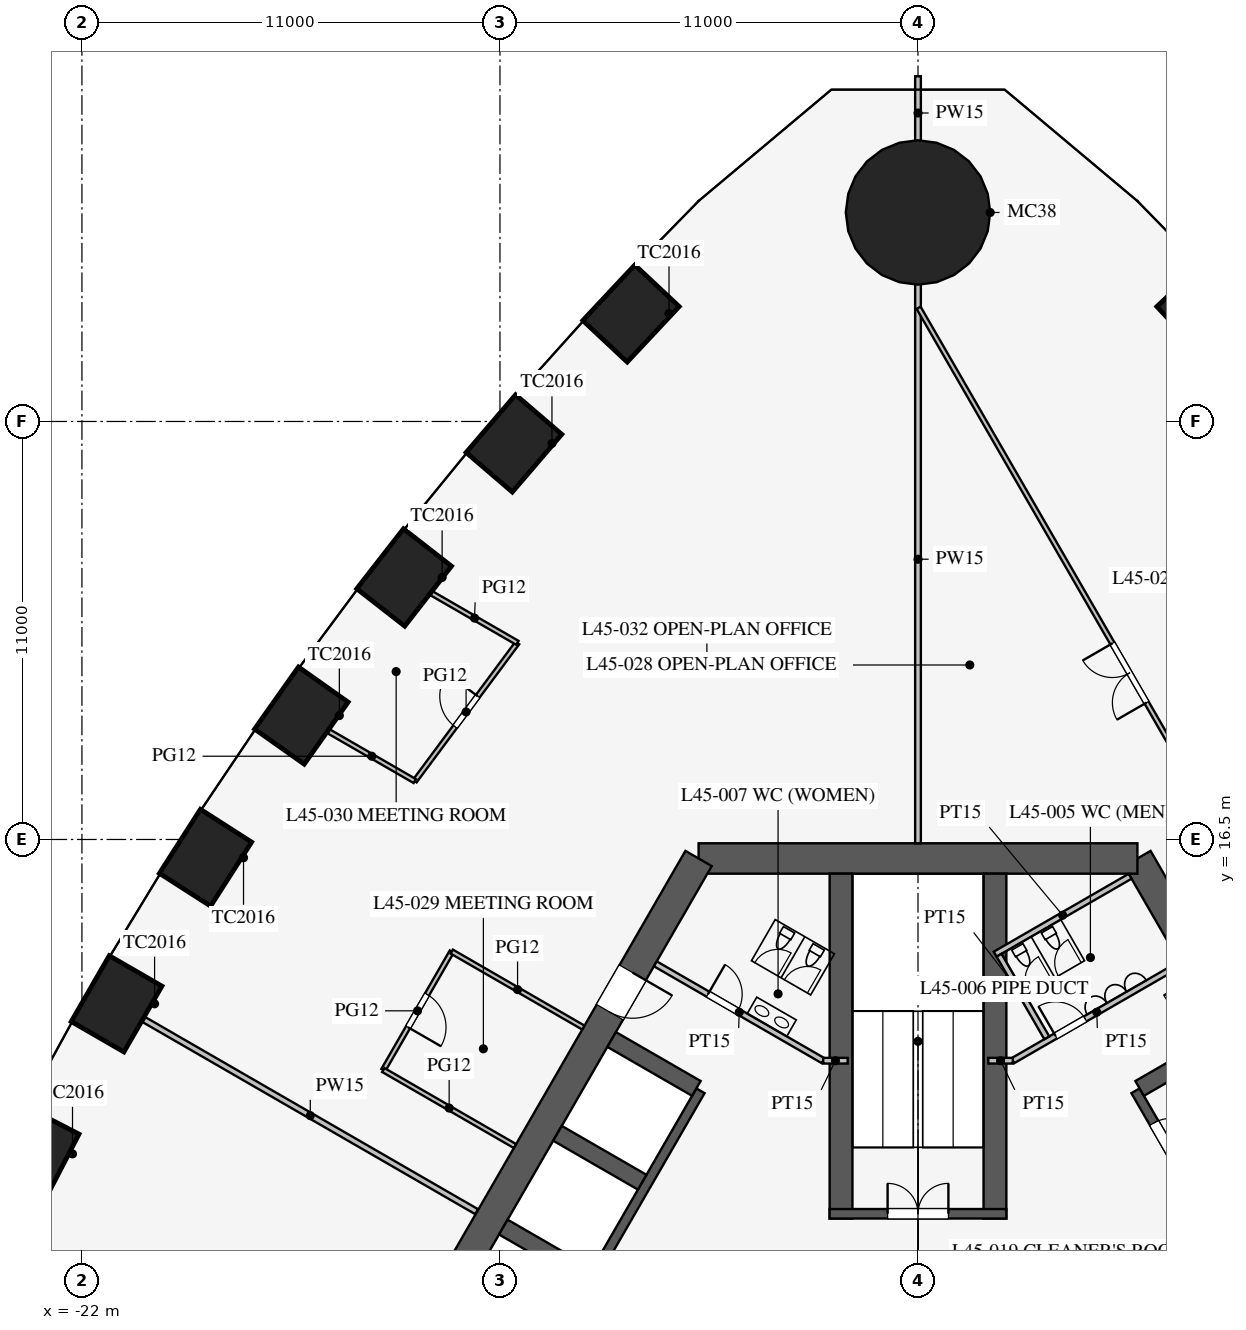
"""IFC4 building model, lengths in metres.
Left out: names, types, materials, properties, quantities, classifications, styles, units other than length and angle.
Written with IfcOpenShell. Run it as: python <this file> out.ifc"""

import sys

from ifc_helpers import new_model, si_unit, direction, frame, frame_2d, origin, origin_2d, place, context, subcontext, project, spatial, rectangle, circle, extrude, element, fill, save


model = new_model("IFC4")
c1 = context("Model", 3, precision=1e-05, world=origin(), true_north=direction((0.0, 1.0)))
c2 = subcontext(c1, "Body", "Model", "MODEL_VIEW")
j1 = project(units=[si_unit("LENGTHUNIT", "METRE"), si_unit("PLANEANGLEUNIT", "RADIAN")], contexts=[c1])
p1 = place(None, origin())
s1 = spatial("IfcSite", under=j1, at=p1, CompositionType="ELEMENT")
p2 = place(p1, origin())
s2 = spatial("IfcBuilding", under=s1, at=p2, CompositionType="ELEMENT")
p3 = place(p2, frame((0.0, 0.0, 198.1)))
s3 = spatial("IfcBuildingStorey", under=s2, at=p3, CompositionType="ELEMENT", Elevation=198.1)
for number, where, z_axis, x_axis in (
    (1, (7.552, 30.341, 0.0), (0.0, 0.0, 1.0), (-0.684, 0.73, 0.0)),
    (2, (-7.552, 30.341, 0.0), (0.0, 0.0, 1.0), (-0.684, -0.73, 0.0)),
    (3, (-10.632, 26.923, 0.0), (0.0, 0.0, 1.0), (-0.651, -0.759, 0.0)),
    (4, (-13.522, 23.396, 0.0), (0.0, 0.0, 1.0), (-0.615, -0.789, 0.0)),
    (5, (-16.227, 19.761, 0.0), (0.0, 0.0, 1.0), (-0.577, -0.816, 0.0)),
    (6, (-18.748, 16.02, 0.0), (0.0, 0.0, 1.0), (-0.539, -0.842, 0.0)),
    (7, (-21.088, 12.175, 0.0), (0.0, 0.0, 1.0), (-0.5, -0.866, 0.0)),
    (8, (-23.248, 8.226, 0.0), (0.0, 0.0, 1.0), (-0.46, -0.888, 0.0)),
):
    element("IfcColumn", number, at=place(p3, frame(where, z_axis=z_axis, x_axis=x_axis)), inside=s3, PredefinedType="COLUMN", context=c2, shape_type="SweptSolid", body=[
        extrude(rectangle(XDim=2.0, YDim=1.6, at=origin_2d()), origin(), (0.0, 0.0, 1.0), 4.2),
    ])
p4 = place(p3, frame((0.0, 33.0, 0.0), z_axis=(0.0, 0.0, 1.0), x_axis=(1.0, 0.0, 0.0)))
e9 = element("IfcColumn", 9, at=p4, inside=s3, PredefinedType="COLUMN", context=c2, shape_type="SweptSolid", body=[
    extrude(circle(Radius=1.9, at=origin_2d()), origin(), (0.0, 0.0, 1.0), 4.2),
])
p5 = place(p3, frame((16.743, -3.0, 0.0), z_axis=(0.0, 0.0, 1.0), x_axis=(-0.500002442456, 0.866023993627, 0.0)))
e10 = element("IfcWall", 10, at=p5, inside=s3, PredefinedType="SHEAR", context=c2, shape_type="SweptSolid", body=[
    extrude(rectangle(XDim=21.939, YDim=0.8, at=frame_2d((10.97, 0.0))), origin(), (0.0, 0.0, 1.0), 4.2),
])
p6 = place(p5, frame((17.27, 0.0, 0.0)))
e11 = element("IfcOpeningElement", 11, at=p6, cuts=e10, PredefinedType="OPENING", context=c2, shape_type="SweptSolid", body=[
    extrude(rectangle(XDim=1.2, YDim=2.1, at=frame_2d((0.6, 1.05))), frame((0.0, 0.41, 0.0), z_axis=(0.0, -1.0, 0.0), x_axis=(1.0, 0.0, 0.0)), (0.0, 0.0, 1.0), 0.82),
])
p7 = place(p5, frame((3.47, 0.0, 0.0)))
e12 = element("IfcOpeningElement", 12, at=p7, cuts=e10, PredefinedType="OPENING", context=c2, shape_type="SweptSolid", body=[
    extrude(rectangle(XDim=1.2, YDim=2.1, at=frame_2d((0.6, 1.05))), frame((0.0, 0.41, 0.0), z_axis=(0.0, -1.0, 0.0), x_axis=(1.0, 0.0, 0.0)), (0.0, 0.0, 1.0), 0.82),
])
p8 = place(p3, frame((5.773, 16.0, 0.0), z_axis=(0.0, 0.0, 1.0), x_axis=(-1.0, 0.0, 0.0)))
e13 = element("IfcWall", 13, at=p8, inside=s3, PredefinedType="SHEAR", context=c2, shape_type="SweptSolid", body=[
    extrude(rectangle(XDim=11.547, YDim=0.8, at=frame_2d((5.773, 0.0))), origin(), (0.0, 0.0, 1.0), 4.2),
])
p9 = place(p3, frame((-5.773, 16.0, 0.0), z_axis=(0.0, 0.0, 1.0), x_axis=(-0.500002442456, -0.866023993627, 0.0)))
e14 = element("IfcWall", 14, at=p9, inside=s3, PredefinedType="SHEAR", context=c2, shape_type="SweptSolid", body=[
    extrude(rectangle(XDim=21.939, YDim=0.8, at=frame_2d((10.97, 0.0))), origin(), (0.0, 0.0, 1.0), 4.2),
])
p10 = place(p9, frame((17.27, 0.0, 0.0)))
e15 = element("IfcOpeningElement", 15, at=p10, cuts=e14, PredefinedType="OPENING", context=c2, shape_type="SweptSolid", body=[
    extrude(rectangle(XDim=1.2, YDim=2.1, at=frame_2d((0.6, 1.05))), frame((0.0, 0.41, 0.0), z_axis=(0.0, -1.0, 0.0), x_axis=(1.0, 0.0, 0.0)), (0.0, 0.0, 1.0), 0.82),
])
p11 = place(p9, frame((3.47, 0.0, 0.0)))
e16 = element("IfcOpeningElement", 16, at=p11, cuts=e14, PredefinedType="OPENING", context=c2, shape_type="SweptSolid", body=[
    extrude(rectangle(XDim=1.2, YDim=2.1, at=frame_2d((0.6, 1.05))), frame((0.0, 0.41, 0.0), z_axis=(0.0, -1.0, 0.0), x_axis=(1.0, 0.0, 0.0)), (0.0, 0.0, 1.0), 0.82),
])
p12 = place(p3, frame((11.424, 0.014, 0.0), z_axis=(0.0, 0.0, 1.0), x_axis=(-0.500001763848, 0.866024385424, 0.0)))
e17 = element("IfcWall", 17, at=p12, inside=s3, PredefinedType="SHEAR", context=c2, shape_type="SweptSolid", body=[
    extrude(rectangle(XDim=11.4, YDim=0.25, at=frame_2d((5.7, 0.0))), origin(), (0.0, 0.0, 1.0), 4.2),
])
p13 = place(p12, frame((0.975, 0.0, 0.0)))
e18 = element("IfcOpeningElement", 18, at=p13, cuts=e17, PredefinedType="OPENING", context=c2, shape_type="SweptSolid", body=[
    extrude(rectangle(XDim=0.9, YDim=2.1, at=frame_2d((0.45, 1.05))), frame((0.0, 0.135, 0.0), z_axis=(0.0, -1.0, 0.0), x_axis=(1.0, 0.0, 0.0)), (0.0, 0.0, 1.0), 0.27),
])
p14 = place(p12, frame((3.825, 0.0, 0.0)))
e19 = element("IfcOpeningElement", 19, at=p14, cuts=e17, PredefinedType="OPENING", context=c2, shape_type="SweptSolid", body=[
    extrude(rectangle(XDim=0.9, YDim=2.1, at=frame_2d((0.45, 1.05))), frame((0.0, 0.135, 0.0), z_axis=(0.0, -1.0, 0.0), x_axis=(1.0, 0.0, 0.0)), (0.0, 0.0, 1.0), 0.27),
])
p15 = place(p12, frame((6.675, 0.0, 0.0)))
e20 = element("IfcOpeningElement", 20, at=p15, cuts=e17, PredefinedType="OPENING", context=c2, shape_type="SweptSolid", body=[
    extrude(rectangle(XDim=0.9, YDim=2.1, at=frame_2d((0.45, 1.05))), frame((0.0, 0.135, 0.0), z_axis=(0.0, -1.0, 0.0), x_axis=(1.0, 0.0, 0.0)), (0.0, 0.0, 1.0), 0.27),
])
p16 = place(p12, frame((9.525, 0.0, 0.0)))
e21 = element("IfcOpeningElement", 21, at=p16, cuts=e17, PredefinedType="OPENING", context=c2, shape_type="SweptSolid", body=[
    extrude(rectangle(XDim=0.9, YDim=2.1, at=frame_2d((0.45, 1.05))), frame((0.0, 0.135, 0.0), z_axis=(0.0, -1.0, 0.0), x_axis=(1.0, 0.0, 0.0)), (0.0, 0.0, 1.0), 0.27),
])
p17 = place(p3, frame((5.832, 9.949, 0.0), z_axis=(0.0, 0.0, 1.0), x_axis=(0.866029291668, 0.499993265928, 0.0)))
e22 = element("IfcWall", 22, at=p17, inside=s3, PredefinedType="SHEAR", context=c2, shape_type="SweptSolid", body=[
    extrude(rectangle(XDim=2.575, YDim=0.45, at=frame_2d((1.288, 0.0))), origin(), (0.0, 0.0, 1.0), 4.2),
])
p18 = place(p3, frame((-5.724, 9.886, 0.0), z_axis=(0.0, 0.0, 1.0), x_axis=(-0.500001763848, -0.866024385424, 0.0)))
e23 = element("IfcWall", 23, at=p18, inside=s3, PredefinedType="SHEAR", context=c2, shape_type="SweptSolid", body=[
    extrude(rectangle(XDim=11.4, YDim=0.25, at=frame_2d((5.7, 0.0))), origin(), (0.0, 0.0, 1.0), 4.2),
])
p19 = place(p18, frame((6.525, 0.0, 0.0)))
e24 = element("IfcOpeningElement", 24, at=p19, cuts=e23, PredefinedType="OPENING", context=c2, shape_type="SweptSolid", body=[
    extrude(rectangle(XDim=1.2, YDim=2.2, at=frame_2d((0.6, 1.1))), frame((0.0, 0.135, 0.0), z_axis=(0.0, -1.0, 0.0), x_axis=(1.0, 0.0, 0.0)), (0.0, 0.0, 1.0), 0.27),
])
p20 = place(p18, frame((9.375, 0.0, 0.0)))
e25 = element("IfcOpeningElement", 25, at=p20, cuts=e23, PredefinedType="OPENING", context=c2, shape_type="SweptSolid", body=[
    extrude(rectangle(XDim=1.2, YDim=2.2, at=frame_2d((0.6, 1.1))), frame((0.0, 0.135, 0.0), z_axis=(0.0, -1.0, 0.0), x_axis=(1.0, 0.0, 0.0)), (0.0, 0.0, 1.0), 0.27),
])
p21 = place(p3, frame((-5.832, 9.949, 0.0), z_axis=(0.0, 0.0, 1.0), x_axis=(-0.866029291668, 0.499993265928, 0.0)))
e26 = element("IfcWall", 26, at=p21, inside=s3, PredefinedType="SHEAR", context=c2, shape_type="SweptSolid", body=[
    extrude(rectangle(XDim=2.575, YDim=0.45, at=frame_2d((1.288, 0.0))), origin(), (0.0, 0.0, 1.0), 4.2),
])
for number, where, z_axis, x_axis in (
    (27, (-7.257, 7.481, 0.0), (0.0, 0.0, 1.0), (-0.866, 0.5, 0.0)),
    (28, (-8.682, 5.012, 0.0), (0.0, 0.0, 1.0), (-0.866, 0.5, 0.0)),
):
    element("IfcWall", number, at=place(p3, frame(where, z_axis=z_axis, x_axis=x_axis)), inside=s3, PredefinedType="SHEAR", context=c2, shape_type="SweptSolid", body=[
        extrude(rectangle(XDim=2.575, YDim=0.45, at=frame_2d((1.288, 0.0))), origin(), (0.0, 0.0, 1.0), 4.2),
    ])
for number, where, z_axis, x_axis in (
    (29, (2.025, 6.525, 0.0), (0.0, 0.0, 1.0), (0.0, 1.0, 0.0)),
    (30, (-2.025, 6.525, 0.0), (0.0, 0.0, 1.0), (0.0, 1.0, 0.0)),
):
    element("IfcWall", number, at=place(p3, frame(where, z_axis=z_axis, x_axis=x_axis)), inside=s3, PredefinedType="SHEAR", context=c2, shape_type="SweptSolid", body=[
        extrude(rectangle(XDim=9.075, YDim=0.6, at=frame_2d((4.538, 0.0))), origin(), (0.0, 0.0, 1.0), 4.2),
    ])
p22 = place(p3, frame((2.325, 6.65, 0.0), z_axis=(0.0, 0.0, 1.0), x_axis=(-1.0, 0.0, 0.0)))
e31 = element("IfcWall", 31, at=p22, inside=s3, PredefinedType="SHEAR", context=c2, shape_type="SweptSolid", body=[
    extrude(rectangle(XDim=4.65, YDim=0.25, at=frame_2d((2.325, 0.0))), origin(), (0.0, 0.0, 1.0), 4.2),
])
p23 = place(p22, frame((1.525, 0.0, 0.0)))
e32 = element("IfcOpeningElement", 32, at=p23, cuts=e31, PredefinedType="OPENING", context=c2, shape_type="SweptSolid", body=[
    extrude(rectangle(XDim=1.6, YDim=2.1, at=frame_2d((0.8, 1.05))), frame((0.0, 0.135, 0.0), z_axis=(0.0, -1.0, 0.0), x_axis=(1.0, 0.0, 0.0)), (0.0, 0.0, 1.0), 0.27),
])
p24 = place(p3, frame((2.495, 10.678, 0.0), z_axis=(0.0, 0.0, 1.0), x_axis=(0.86602216432, 0.500005610874, 0.0)))
e33 = element("IfcWall", 33, at=p24, inside=s3, PredefinedType="PARTITIONING", context=c2, shape_type="SweptSolid", body=[
    extrude(rectangle(XDim=5.1, YDim=0.15, at=frame_2d((2.55, 0.0))), origin(), (0.0, 0.0, 1.0), 4.0),
])
p25 = place(p24, frame((1.3, 0.0, 0.0)))
e34 = element("IfcOpeningElement", 34, at=p25, cuts=e33, PredefinedType="OPENING", context=c2, shape_type="SweptSolid", body=[
    extrude(rectangle(XDim=0.9, YDim=2.1, at=frame_2d((0.45, 1.05))), frame((0.0, 0.085, 0.0), z_axis=(0.0, -1.0, 0.0), x_axis=(1.0, 0.0, 0.0)), (0.0, 0.0, 1.0), 0.17),
])
p26 = place(p3, frame((-2.495, 10.678, 0.0), z_axis=(0.0, 0.0, 1.0), x_axis=(-0.86602216432, 0.500005610874, 0.0)))
e35 = element("IfcWall", 35, at=p26, inside=s3, PredefinedType="PARTITIONING", context=c2, shape_type="SweptSolid", body=[
    extrude(rectangle(XDim=5.1, YDim=0.15, at=frame_2d((2.55, 0.0))), origin(), (0.0, 0.0, 1.0), 4.0),
])
p27 = place(p26, frame((2.6, 0.0, 0.0)))
e36 = element("IfcOpeningElement", 36, at=p27, cuts=e35, PredefinedType="OPENING", context=c2, shape_type="SweptSolid", body=[
    extrude(rectangle(XDim=0.9, YDim=2.1, at=frame_2d((0.45, 1.05))), frame((0.0, 0.085, 0.0), z_axis=(0.0, -1.0, 0.0), x_axis=(1.0, 0.0, 0.0)), (0.0, 0.0, 1.0), 0.17),
])
for number, where, z_axis, x_axis in (
    (37, (2.495, 10.678, 0.0), (0.0, 0.0, 1.0), (-1.0, 0.0, 0.0)),
    (38, (-2.495, 10.678, 0.0), (0.0, 0.0, 1.0), (1.0, 0.0, 0.0)),
):
    element("IfcWall", number, at=place(p3, frame(where, z_axis=z_axis, x_axis=x_axis)), inside=s3, PredefinedType="PARTITIONING", context=c2, shape_type="SweptSolid", body=[
        extrude(rectangle(XDim=0.645, YDim=0.15, at=frame_2d((0.323, 0.0))), origin(), (0.0, 0.0, 1.0), 4.0),
    ])
p28 = place(p3, frame((2.031, 13.482, 0.0), z_axis=(0.0, 0.0, 1.0), x_axis=(0.866050731258, 0.499956128963, 0.0)))
e39 = element("IfcWall", 39, at=p28, inside=s3, PredefinedType="PARTITIONING", context=c2, shape_type="SweptSolid", body=[
    extrude(rectangle(XDim=4.1, YDim=0.15, at=frame_2d((2.05, 0.0))), origin(), (0.0, 0.0, 1.0), 4.0),
])
p29 = place(p3, frame((3.389, 11.281, 0.0), z_axis=(0.0, 0.0, 1.0), x_axis=(-0.499989096993, 0.866031698547, 0.0)))
e40 = element("IfcWall", 40, at=p29, inside=s3, PredefinedType="PARTITIONING", context=c2, shape_type="SweptSolid", body=[
    extrude(rectangle(XDim=2.51, YDim=0.15, at=frame_2d((1.255, 0.0))), origin(), (0.0, 0.0, 1.0), 4.0),
])
p30 = place(p3, frame((0.0, 16.4, 0.0), z_axis=(0.0, 0.0, 1.0), x_axis=(0.0, 1.0, 0.0)))
e41 = element("IfcWall", 41, at=p30, inside=s3, PredefinedType="PARTITIONING", context=c2, shape_type="SweptSolid", body=[
    extrude(rectangle(XDim=14.95, YDim=0.15, at=frame_2d((7.475, 0.0))), origin(), (0.0, 0.0, 1.0), 2.4),
])
p31 = place(p3, frame((0.0, 34.65, 0.0), z_axis=(0.0, 0.0, 1.0), x_axis=(0.0, 1.0, 0.0)))
e42 = element("IfcWall", 42, at=p31, inside=s3, PredefinedType="PARTITIONING", context=c2, shape_type="SweptSolid", body=[
    extrude(rectangle(XDim=1.935, YDim=0.15, at=frame_2d((0.967, 0.0))), origin(), (0.0, 0.0, 1.0), 2.4),
])
p32 = place(p3, frame((26.415, -15.231, 0.0), z_axis=(0.0, 0.0, 1.0), x_axis=(-0.50000091641, 0.866024874695, 0.0)))
e43 = element("IfcWall", 43, at=p32, inside=s3, PredefinedType="PARTITIONING", context=c2, shape_type="SweptSolid", body=[
    extrude(rectangle(XDim=52.796, YDim=0.12, at=frame_2d((26.398, 0.0))), origin(), (0.0, 0.0, 1.0), 2.9),
])
p33 = place(p32, frame((10.2, 0.0, 0.15)))
e44 = element("IfcOpeningElement", 44, at=p33, cuts=e43, PredefinedType="OPENING", context=c2, shape_type="SweptSolid", body=[
    extrude(rectangle(XDim=1.8, YDim=2.1, at=frame_2d((0.9, 1.05))), frame((0.0, 0.07, 0.0), z_axis=(0.0, -1.0, 0.0), x_axis=(1.0, 0.0, 0.0)), (0.0, 0.0, 1.0), 0.14),
])
p34 = place(p32, frame((40.8, 0.0, 0.15)))
e45 = element("IfcOpeningElement", 45, at=p34, cuts=e43, PredefinedType="OPENING", context=c2, shape_type="SweptSolid", body=[
    extrude(rectangle(XDim=1.8, YDim=2.1, at=frame_2d((0.9, 1.05))), frame((0.0, 0.07, 0.0), z_axis=(0.0, -1.0, 0.0), x_axis=(1.0, 0.0, 0.0)), (0.0, 0.0, 1.0), 0.14),
])
p35 = place(p3, frame((-11.613, 6.705, 0.0), z_axis=(0.0, 0.0, 1.0), x_axis=(-0.866032382055, 0.499987913086, 0.0)))
e46 = element("IfcWall", 46, at=p35, inside=s3, PredefinedType="PARTITIONING", context=c2, shape_type="SweptSolid", body=[
    extrude(rectangle(XDim=10.111, YDim=0.15, at=frame_2d((5.055, 0.0))), origin(), (0.0, 0.0, 1.0), 2.992),
])
p36 = place(p3, frame((-12.269, 13.55, 0.0), z_axis=(0.0, 0.0, 1.0), x_axis=(-0.500012057535, -0.866018442252, 0.0)))
e47 = element("IfcWall", 47, at=p36, inside=s3, PredefinedType="PARTITIONING", context=c2, shape_type="SweptSolid", body=[
    extrude(rectangle(XDim=3.6, YDim=0.12, at=frame_2d((1.8, 0.0))), origin(), (0.0, 0.0, 1.0), 2.9),
])
p37 = place(p36, frame((1.3, 0.0, 0.15)))
e48 = element("IfcOpeningElement", 48, at=p37, cuts=e47, PredefinedType="OPENING", context=c2, shape_type="SweptSolid", body=[
    extrude(rectangle(XDim=1.0, YDim=2.1, at=frame_2d((0.5, 1.05))), frame((0.0, 0.07, 0.0), z_axis=(0.0, -1.0, 0.0), x_axis=(1.0, 0.0, 0.0)), (0.0, 0.0, 1.0), 0.14),
])
for number, where, z_axis, x_axis in (
    (49, (-10.605, 8.432, 0.0), (0.0, 0.0, 1.0), (-0.866, 0.5, 0.0)),
    (50, (-8.805, 11.55, 0.0), (0.0, 0.0, 1.0), (-0.866, 0.5, 0.0)),
):
    element("IfcWall", number, at=place(p3, frame(where, z_axis=z_axis, x_axis=x_axis)), inside=s3, PredefinedType="PARTITIONING", context=c2, shape_type="SweptSolid", body=[
        extrude(rectangle(XDim=4.0, YDim=0.12, at=frame_2d((2.0, 0.0))), origin(), (0.0, 0.0, 1.0), 2.9),
    ])
p38 = place(p3, frame((-10.541, 21.674, 0.0), z_axis=(0.0, 0.0, 1.0), x_axis=(-0.596173167565, -0.802855873912, 0.0)))
e51 = element("IfcWall", 51, at=p38, inside=s3, PredefinedType="PARTITIONING", context=c2, shape_type="SweptSolid", body=[
    extrude(rectangle(XDim=4.53, YDim=0.12, at=frame_2d((2.265, 0.0))), origin(), (0.0, 0.0, 1.0), 2.9),
])
p39 = place(p38, frame((1.75, 0.0, 0.15)))
e52 = element("IfcOpeningElement", 52, at=p39, cuts=e51, PredefinedType="OPENING", context=c2, shape_type="SweptSolid", body=[
    extrude(rectangle(XDim=1.0, YDim=2.1, at=frame_2d((0.5, 1.05))), frame((0.0, 0.07, 0.0), z_axis=(0.0, -1.0, 0.0), x_axis=(1.0, 0.0, 0.0)), (0.0, 0.0, 1.0), 0.14),
])
p40 = place(p3, frame((-10.541, 21.674, 0.0), z_axis=(0.0, 0.0, 1.0), x_axis=(-0.866031051173, 0.499990218309, 0.0)))
e53 = element("IfcWall", 53, at=p40, inside=s3, PredefinedType="PARTITIONING", context=c2, shape_type="SweptSolid", body=[
    extrude(rectangle(XDim=2.604, YDim=0.12, at=frame_2d((1.302, 0.0))), origin(), (0.0, 0.0, 1.0), 2.8),
])
p41 = place(p3, frame((-13.242, 18.037, 0.0), z_axis=(0.0, 0.0, 1.0), x_axis=(-0.866003542134, 0.500037863578, 0.0)))
e54 = element("IfcWall", 54, at=p41, inside=s3, PredefinedType="PARTITIONING", context=c2, shape_type="SweptSolid", body=[
    extrude(rectangle(XDim=2.613, YDim=0.12, at=frame_2d((1.307, 0.0))), origin(), (0.0, 0.0, 1.0), 2.9),
])
p42 = place(p25, origin())
e55 = element("IfcDoor", 55, at=p42, inside=s3, OperationType="SINGLE_SWING_LEFT", PredefinedType="DOOR", context=c2, shape_type="SweptSolid", body=[
    extrude(rectangle(XDim=0.9, YDim=2.1, at=frame_2d((0.45, 1.05))), frame((0.0, 0.025, 0.0), z_axis=(0.0, -1.0, 0.0), x_axis=(1.0, 0.0, 0.0)), (0.0, 0.0, 1.0), 0.05),
])
fill(e34, e55)
p43 = place(p27, frame((0.9, 0.0, 0.0), z_axis=(0.0, 0.0, 1.0), x_axis=(-1.0, 0.0, 0.0)))
e56 = element("IfcDoor", 56, at=p43, inside=s3, OperationType="SINGLE_SWING_LEFT", PredefinedType="DOOR", context=c2, shape_type="SweptSolid", body=[
    extrude(rectangle(XDim=0.9, YDim=2.1, at=frame_2d((0.45, 1.05))), frame((0.0, 0.025, 0.0), z_axis=(0.0, -1.0, 0.0), x_axis=(1.0, 0.0, 0.0)), (0.0, 0.0, 1.0), 0.05),
])
fill(e36, e56)
p44 = place(p23, frame((1.6, 0.0, 0.0), z_axis=(0.0, 0.0, 1.0), x_axis=(-1.0, 0.0, 0.0)))
e57 = element("IfcDoor", 57, at=p44, inside=s3, OperationType="DOUBLE_DOOR_SINGLE_SWING", PredefinedType="DOOR", context=c2, shape_type="SweptSolid", body=[
    extrude(rectangle(XDim=1.6, YDim=2.1, at=frame_2d((0.8, 1.05))), frame((0.0, 0.025, 0.0), z_axis=(0.0, -1.0, 0.0), x_axis=(1.0, 0.0, 0.0)), (0.0, 0.0, 1.0), 0.05),
])
fill(e32, e57)
p45 = place(p11, origin())
e58 = element("IfcDoor", 58, at=p45, inside=s3, OperationType="SINGLE_SWING_LEFT", PredefinedType="DOOR", context=c2, shape_type="SweptSolid", body=[
    extrude(rectangle(XDim=1.2, YDim=2.1, at=frame_2d((0.6, 1.05))), frame((0.0, 0.025, 0.0), z_axis=(0.0, -1.0, 0.0), x_axis=(1.0, 0.0, 0.0)), (0.0, 0.0, 1.0), 0.05),
])
fill(e16, e58)
p46 = place(p16, frame((0.9, 0.0, 0.0), z_axis=(0.0, 0.0, 1.0), x_axis=(-1.0, 0.0, 0.0)))
e59 = element("IfcDoor", 59, at=p46, inside=s3, OperationType="SINGLE_SWING_RIGHT", PredefinedType="DOOR", context=c2, shape_type="SweptSolid", body=[
    extrude(rectangle(XDim=0.9, YDim=2.1, at=frame_2d((0.45, 1.05))), frame((0.0, 0.025, 0.0), z_axis=(0.0, -1.0, 0.0), x_axis=(1.0, 0.0, 0.0)), (0.0, 0.0, 1.0), 0.05),
])
fill(e21, e59)
p47 = place(p34, origin())
e60 = element("IfcDoor", 60, at=p47, inside=s3, OperationType="DOUBLE_DOOR_SINGLE_SWING", PredefinedType="DOOR", context=c2, shape_type="SweptSolid", body=[
    extrude(rectangle(XDim=1.8, YDim=2.1, at=frame_2d((0.9, 1.05))), frame((0.0, 0.025, 0.0), z_axis=(0.0, -1.0, 0.0), x_axis=(1.0, 0.0, 0.0)), (0.0, 0.0, 1.0), 0.05),
])
fill(e45, e60)
p48 = place(p37, origin())
e61 = element("IfcDoor", 61, at=p48, inside=s3, OperationType="SINGLE_SWING_RIGHT", PredefinedType="DOOR", context=c2, shape_type="SweptSolid", body=[
    extrude(rectangle(XDim=1.0, YDim=2.1, at=frame_2d((0.5, 1.05))), frame((0.0, 0.025, 0.0), z_axis=(0.0, -1.0, 0.0), x_axis=(1.0, 0.0, 0.0)), (0.0, 0.0, 1.0), 0.05),
])
fill(e48, e61)
p49 = place(p39, frame((1.0, 0.0, 0.0), z_axis=(0.0, 0.0, 1.0), x_axis=(-1.0, 0.0, 0.0)))
e62 = element("IfcDoor", 62, at=p49, inside=s3, OperationType="SINGLE_SWING_RIGHT", PredefinedType="DOOR", context=c2, shape_type="SweptSolid", body=[
    extrude(rectangle(XDim=1.0, YDim=2.1, at=frame_2d((0.5, 1.05))), frame((0.0, 0.025, 0.0), z_axis=(0.0, -1.0, 0.0), x_axis=(1.0, 0.0, 0.0)), (0.0, 0.0, 1.0), 0.05),
])
fill(e52, e62)
save(model, sys.argv[1])
